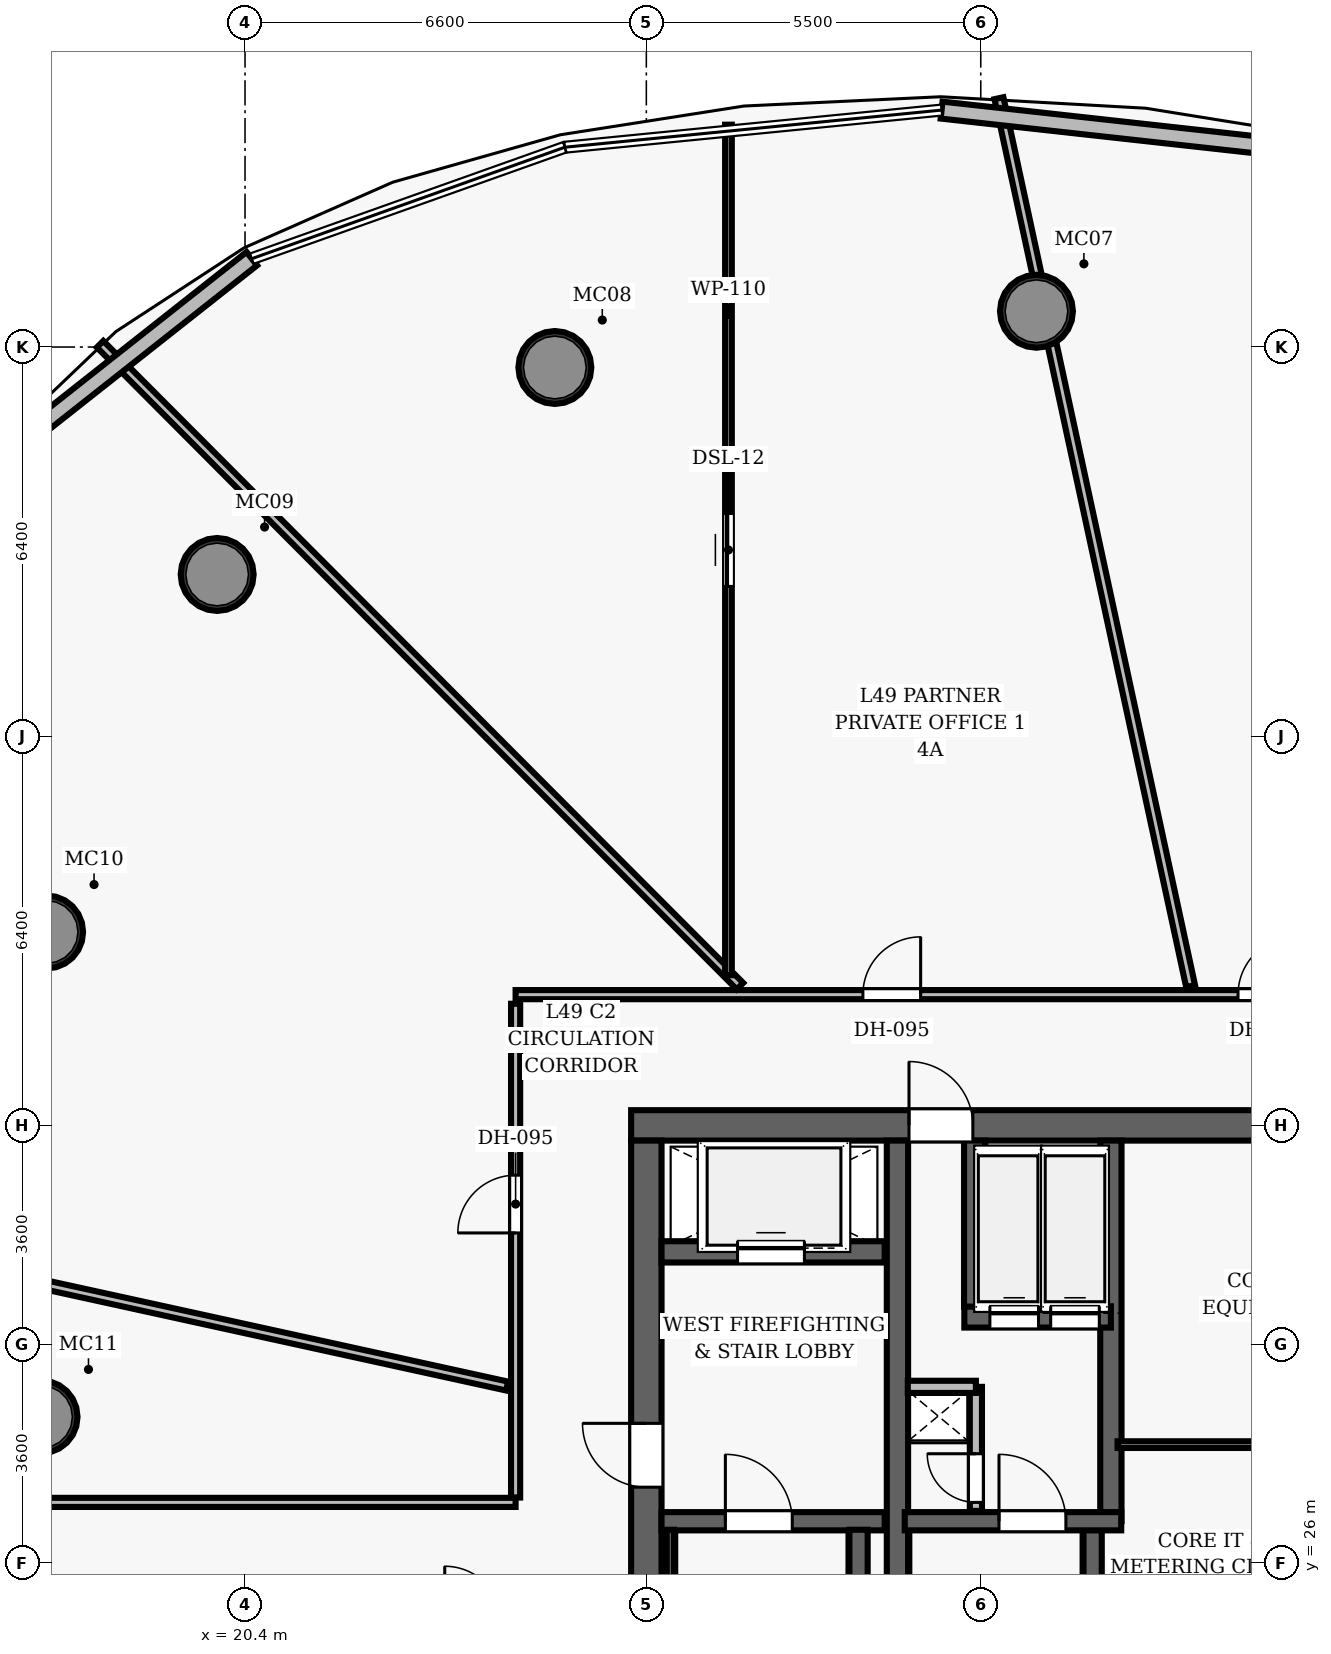
"""IFC4 building model, lengths in metres.
Left out: names, types, materials, properties, quantities, classifications, styles, units other than length and angle.
Written with IfcOpenShell. Run it as: python <this file> out.ifc"""

import sys

from ifc_helpers import new_model, si_unit, direction, frame, frame_2d, origin, origin_2d, place, context, subcontext, project, spatial, rectangle, hollow_circle, extrude, element, fill, save


model = new_model("IFC4")
c1 = context("Model", 3, precision=1e-05, world=origin(), true_north=direction((0.0, 1.0)))
c2 = subcontext(c1, "Body", "Model", "MODEL_VIEW")
j1 = project(units=[si_unit("LENGTHUNIT", "METRE"), si_unit("PLANEANGLEUNIT", "RADIAN")], contexts=[c1])
p1 = place(None, origin())
s1 = spatial("IfcSite", under=j1, at=p1, CompositionType="ELEMENT")
p2 = place(p1, origin())
s2 = spatial("IfcBuilding", under=s1, at=p2, CompositionType="ELEMENT")
p3 = place(p2, frame((0.0, 0.0, 194.3)))
s3 = spatial("IfcBuildingStorey", under=s2, at=p3, CompositionType="ELEMENT", Elevation=194.3)
p4 = place(p3, frame((26.75, 33.2, 0.0), z_axis=(0.0, 0.0, 1.0), x_axis=(1.0, 0.0, 0.0)))
e1 = element("IfcWall", 1, at=p4, inside=s3, PredefinedType="SHEAR", context=c2, shape_type="SweptSolid", body=[
    extrude(rectangle(XDim=22.5, YDim=0.5, at=frame_2d((11.25, 0.0))), origin(), (0.0, 0.0, 1.0), 3.85),
])
p5 = place(p4, frame((4.57, 0.0, 0.0)))
e2 = element("IfcOpeningElement", 2, at=p5, cuts=e1, PredefinedType="OPENING", context=c2, shape_type="SweptSolid", body=[
    extrude(rectangle(XDim=1.05, YDim=2.15, at=frame_2d((0.525, 1.075))), frame((0.0, 0.26, 0.0), z_axis=(0.0, -1.0, 0.0), x_axis=(1.0, 0.0, 0.0)), (0.0, 0.0, 1.0), 0.52),
])
p6 = place(p4, frame((14.47, 0.0, 0.0)))
e3 = element("IfcOpeningElement", 3, at=p6, cuts=e1, PredefinedType="OPENING", context=c2, shape_type="SweptSolid", body=[
    extrude(rectangle(XDim=1.05, YDim=2.15, at=frame_2d((0.525, 1.075))), frame((0.0, 0.26, 0.0), z_axis=(0.0, -1.0, 0.0), x_axis=(1.0, 0.0, 0.0)), (0.0, 0.0, 1.0), 0.52),
])
p7 = place(p3, frame((27.0, 19.05, 0.0), z_axis=(0.0, 0.0, 1.0), x_axis=(0.0, 1.0, 0.0)))
e4 = element("IfcWall", 4, at=p7, inside=s3, PredefinedType="SHEAR", context=c2, shape_type="SweptSolid", body=[
    extrude(rectangle(XDim=13.9, YDim=0.5, at=frame_2d((6.95, 0.0))), origin(), (0.0, 0.0, 1.0), 3.85),
])
p8 = place(p7, frame((8.2, 0.0, 0.0)))
e5 = element("IfcOpeningElement", 5, at=p8, cuts=e4, PredefinedType="OPENING", context=c2, shape_type="SweptSolid", body=[
    extrude(rectangle(XDim=1.05, YDim=2.15, at=frame_2d((0.525, 1.075))), frame((0.0, 0.26, 0.0), z_axis=(0.0, -1.0, 0.0), x_axis=(1.0, 0.0, 0.0)), (0.0, 0.0, 1.0), 0.52),
])
p9 = place(p3, frame((31.13, 19.05, 0.0), z_axis=(0.0, 0.0, 1.0), x_axis=(0.0, 1.0, 0.0)))
e6 = element("IfcWall", 6, at=p9, inside=s3, PredefinedType="SHEAR", context=c2, shape_type="SweptSolid", body=[
    extrude(rectangle(XDim=13.9, YDim=0.35, at=frame_2d((6.95, 0.0))), origin(), (0.0, 0.0, 1.0), 3.85),
])
for number, where, z_axis, x_axis in (
    (7, (33.416, 46.588, 0.0), (0.0, 0.0, 1.0), (1.0, 0.0, 0.0)),
    (8, (25.496, 45.664, 0.0), (0.0, 0.0, 1.0), (1.0, 0.0, 0.0)),
    (9, (19.942, 42.26, 0.0), (0.0, 0.0, 1.0), (1.0, 0.0, 0.0)),
    (10, (17.137, 36.381, 0.0), (0.0, 0.0, 1.0), (1.0, 0.0, 0.0)),
    (11, (17.045, 28.406, 0.0), (0.0, 0.0, 1.0), (1.0, 0.0, 0.0)),
):
    element("IfcColumn", number, at=place(p3, frame(where, z_axis=z_axis, x_axis=x_axis)), inside=s3, PredefinedType="COLUMN", context=c2, shape_type="SweptSolid", body=[
        extrude(hollow_circle(Radius=0.6, WallThickness=0.05, at=origin_2d()), origin(), (0.0, 0.0, 1.0), 3.85),
    ])
p10 = place(p3, frame((27.25, 26.69, 0.0), z_axis=(0.0, 0.0, 1.0), x_axis=(1.0, 0.0, 0.0)))
e12 = element("IfcWall", 12, at=p10, inside=s3, PredefinedType="SHEAR", context=c2, shape_type="SweptSolid", body=[
    extrude(rectangle(XDim=3.67, YDim=0.3, at=frame_2d((1.835, 0.0))), origin(), (0.0, 0.0, 1.0), 3.85),
])
p11 = place(p10, frame((1.05, 0.0, 0.0)))
e13 = element("IfcOpeningElement", 13, at=p11, cuts=e12, PredefinedType="OPENING", context=c2, shape_type="SweptSolid", body=[
    extrude(rectangle(XDim=1.1, YDim=2.15, at=frame_2d((0.55, 1.075))), frame((0.0, 0.16, 0.0), z_axis=(0.0, -1.0, 0.0), x_axis=(1.0, 0.0, 0.0)), (0.0, 0.0, 1.0), 0.32),
])
p12 = place(p3, frame((30.49, 19.05, 0.0), z_axis=(0.0, 0.0, 1.0), x_axis=(0.0, 1.0, 0.0)))
e14 = element("IfcWall", 14, at=p12, inside=s3, PredefinedType="SHEAR", context=c2, shape_type="SweptSolid", body=[
    extrude(rectangle(XDim=7.5, YDim=0.3, at=frame_2d((3.75, 0.0))), origin(), (0.0, 0.0, 1.0), 3.85),
])
p13 = place(p3, frame((27.395, 19.1, 0.0), z_axis=(0.0, 0.0, 1.0), x_axis=(0.0, 1.0, 0.0)))
e15 = element("IfcWall", 15, at=p13, inside=s3, PredefinedType="SHEAR", context=c2, shape_type="SweptSolid", body=[
    extrude(rectangle(XDim=7.45, YDim=0.12, at=frame_2d((3.725, 0.0))), origin(), (0.0, 0.0, 1.0), 3.85),
])
p14 = place(p3, frame((27.25, 31.12, 0.0), z_axis=(0.0, 0.0, 1.0), x_axis=(1.0, 0.0, 0.0)))
e16 = element("IfcWall", 16, at=p14, inside=s3, PredefinedType="SHEAR", context=c2, shape_type="SweptSolid", body=[
    extrude(rectangle(XDim=3.67, YDim=0.35, at=frame_2d((1.835, 0.0))), origin(), (0.0, 0.0, 1.0), 3.035),
])
p15 = place(p14, frame((1.25, 0.0, 0.0)))
e17 = element("IfcOpeningElement", 17, at=p15, cuts=e16, PredefinedType="OPENING", context=c2, shape_type="SweptSolid", body=[
    extrude(rectangle(XDim=1.1, YDim=2.15, at=frame_2d((0.55, 1.075))), frame((0.0, 0.185, 0.0), z_axis=(0.0, -1.0, 0.0), x_axis=(1.0, 0.0, 0.0)), (0.0, 0.0, 1.0), 0.37),
])
p16 = place(p3, frame((34.34, 19.05, 0.0), z_axis=(0.0, 0.0, 1.0), x_axis=(0.0, 1.0, 0.0)))
e18 = element("IfcWall", 18, at=p16, inside=s3, PredefinedType="SHEAR", context=c2, shape_type="SweptSolid", body=[
    extrude(rectangle(XDim=7.5, YDim=0.3, at=frame_2d((3.75, 0.0))), origin(), (0.0, 0.0, 1.0), 3.85),
])
p17 = place(p3, frame((34.64, 26.69, 0.0), z_axis=(0.0, 0.0, 1.0), x_axis=(0.0, 1.0, 0.0)))
e19 = element("IfcWall", 19, at=p17, inside=s3, PredefinedType="SHEAR", context=c2, shape_type="SweptSolid", body=[
    extrude(rectangle(XDim=6.26, YDim=0.35, at=frame_2d((3.13, 0.0))), origin(), (0.0, 0.0, 1.0), 3.85),
])
p18 = place(p3, frame((31.25, 26.69, 0.0), z_axis=(0.0, 0.0, 1.0), x_axis=(1.0, 0.0, 0.0)))
e20 = element("IfcWall", 20, at=p18, inside=s3, PredefinedType="SHEAR", context=c2, shape_type="SweptSolid", body=[
    extrude(rectangle(XDim=3.56, YDim=0.3, at=frame_2d((1.78, 0.0))), origin(), (0.0, 0.0, 1.0), 3.85),
])
p19 = place(p18, frame((1.55, 0.0, 0.0)))
e21 = element("IfcOpeningElement", 21, at=p19, cuts=e20, PredefinedType="OPENING", context=c2, shape_type="SweptSolid", body=[
    extrude(rectangle(XDim=1.1, YDim=2.15, at=frame_2d((0.55, 1.075))), frame((0.0, 0.16, 0.0), z_axis=(0.0, -1.0, 0.0), x_axis=(1.0, 0.0, 0.0)), (0.0, 0.0, 1.0), 0.32),
])
p20 = place(p3, frame((32.23, 30.05, 0.0), z_axis=(0.0, 0.0, 1.0), x_axis=(1.0, 0.0, 0.0)))
e22 = element("IfcWall", 22, at=p20, inside=s3, PredefinedType="SHEAR", context=c2, shape_type="SweptSolid", body=[
    extrude(rectangle(XDim=2.41, YDim=0.35, at=frame_2d((1.205, 0.0))), origin(), (0.0, 0.0, 1.0), 3.035),
])
p21 = place(p20, frame((0.42, 0.0, 0.0)))
e23 = element("IfcOpeningElement", 23, at=p21, cuts=e22, PredefinedType="OPENING", context=c2, shape_type="SweptSolid", body=[
    extrude(rectangle(XDim=0.8, YDim=2.15, at=frame_2d((0.4, 1.075))), frame((0.0, 0.185, 0.0), z_axis=(0.0, -1.0, 0.0), x_axis=(1.0, 0.0, 0.0)), (0.0, 0.0, 1.0), 0.37),
])
p22 = place(p20, frame((1.42, 0.0, 0.0)))
e24 = element("IfcOpeningElement", 24, at=p22, cuts=e22, PredefinedType="OPENING", context=c2, shape_type="SweptSolid", body=[
    extrude(rectangle(XDim=0.8, YDim=2.15, at=frame_2d((0.4, 1.075))), frame((0.0, 0.185, 0.0), z_axis=(0.0, -1.0, 0.0), x_axis=(1.0, 0.0, 0.0)), (0.0, 0.0, 1.0), 0.37),
])
p23 = place(p3, frame((32.4, 30.22, 0.0), z_axis=(0.0, 0.0, 1.0), x_axis=(0.0, 1.0, 0.0)))
e25 = element("IfcWall", 25, at=p23, inside=s3, PredefinedType="SHEAR", context=c2, shape_type="SweptSolid", body=[
    extrude(rectangle(XDim=2.73, YDim=0.35, at=frame_2d((1.365, 0.0))), origin(), (0.0, 0.0, 1.0), 3.035),
])
p24 = place(p3, frame((32.42, 26.86, 0.0), z_axis=(0.0, 0.0, 1.0), x_axis=(0.0, 1.0, 0.0)))
e26 = element("IfcWall", 26, at=p24, inside=s3, PredefinedType="PARTITIONING", context=c2, shape_type="SweptSolid", body=[
    extrude(rectangle(XDim=2.04, YDim=0.2, at=frame_2d((1.02, 0.0))), origin(), (0.0, 0.0, 1.0), 3.035),
])
p25 = place(p24, frame((0.14, 0.0, 0.0)))
e27 = element("IfcOpeningElement", 27, at=p25, cuts=e26, PredefinedType="OPENING", context=c2, shape_type="SweptSolid", body=[
    extrude(rectangle(XDim=0.8, YDim=2.05, at=frame_2d((0.4, 1.025))), frame((0.0, 0.11, 0.0), z_axis=(0.0, -1.0, 0.0), x_axis=(1.0, 0.0, 0.0)), (0.0, 0.0, 1.0), 0.22),
])
p26 = place(p3, frame((31.3, 28.9, 0.0), z_axis=(0.0, 0.0, 1.0), x_axis=(1.0, 0.0, 0.0)))
e28 = element("IfcWall", 28, at=p26, inside=s3, PredefinedType="PARTITIONING", context=c2, shape_type="SweptSolid", body=[
    extrude(rectangle(XDim=1.12, YDim=0.2, at=frame_2d((0.56, 0.0))), origin(), (0.0, 0.0, 1.0), 3.035),
])
p27 = place(p3, frame((34.75, 27.95, 0.0), z_axis=(0.0, 0.0, 1.0), x_axis=(1.0, 0.0, 0.0)))
e29 = element("IfcWall", 29, at=p27, inside=s3, PredefinedType="PARTITIONING", context=c2, shape_type="SweptSolid", body=[
    extrude(rectangle(XDim=6.25, YDim=0.11, at=frame_2d((3.125, 0.0))), origin(), (0.0, 0.0, 1.0), 3.035),
])
p28 = place(p3, frame((24.85, 35.35, 0.0), z_axis=(0.0, 0.0, 1.0), x_axis=(1.0, 0.0, 0.0)))
e30 = element("IfcWall", 30, at=p28, inside=s3, PredefinedType="PARTITIONING", context=c2, shape_type="SweptSolid", body=[
    extrude(rectangle(XDim=26.0, YDim=0.15, at=frame_2d((13.0, 0.0))), origin(), (0.0, 0.0, 1.0), 3.035),
])
p29 = place(p28, frame((18.327, 0.0, 0.0)))
e31 = element("IfcOpeningElement", 31, at=p29, cuts=e30, PredefinedType="OPENING", context=c2, shape_type="SweptSolid", body=[
    extrude(rectangle(XDim=0.95, YDim=2.15, at=frame_2d((0.475, 1.075))), frame((0.0, 0.085, 0.0), z_axis=(0.0, -1.0, 0.0), x_axis=(1.0, 0.0, 0.0)), (0.0, 0.0, 1.0), 0.17),
])
p30 = place(p28, frame((11.881, 0.0, 0.0)))
e32 = element("IfcOpeningElement", 32, at=p30, cuts=e30, PredefinedType="OPENING", context=c2, shape_type="SweptSolid", body=[
    extrude(rectangle(XDim=0.95, YDim=2.15, at=frame_2d((0.475, 1.075))), frame((0.0, 0.085, 0.0), z_axis=(0.0, -1.0, 0.0), x_axis=(1.0, 0.0, 0.0)), (0.0, 0.0, 1.0), 0.17),
])
p31 = place(p28, frame((5.711, 0.0, 0.0)))
e33 = element("IfcOpeningElement", 33, at=p31, cuts=e30, PredefinedType="OPENING", context=c2, shape_type="SweptSolid", body=[
    extrude(rectangle(XDim=0.95, YDim=2.15, at=frame_2d((0.475, 1.075))), frame((0.0, 0.085, 0.0), z_axis=(0.0, -1.0, 0.0), x_axis=(1.0, 0.0, 0.0)), (0.0, 0.0, 1.0), 0.17),
])
p32 = place(p3, frame((24.85, 27.08, 0.0), z_axis=(0.0, 0.0, 1.0), x_axis=(0.0, 1.0, 0.0)))
e34 = element("IfcWall", 34, at=p32, inside=s3, PredefinedType="PARTITIONING", context=c2, shape_type="SweptSolid", body=[
    extrude(rectangle(XDim=8.12, YDim=0.15, at=frame_2d((4.06, 0.0))), origin(), (0.0, 0.0, 1.0), 3.035),
])
p33 = place(p32, frame((4.351, 0.0, 0.0)))
e35 = element("IfcOpeningElement", 35, at=p33, cuts=e34, PredefinedType="OPENING", context=c2, shape_type="SweptSolid", body=[
    extrude(rectangle(XDim=0.95, YDim=2.15, at=frame_2d((0.475, 1.075))), frame((0.0, 0.085, 0.0), z_axis=(0.0, -1.0, 0.0), x_axis=(1.0, 0.0, 0.0)), (0.0, 0.0, 1.0), 0.17),
])
p34 = place(p3, frame((16.088, 27.0, 0.0), z_axis=(0.0, 0.0, 1.0), x_axis=(1.0, 0.0, 0.0)))
e36 = element("IfcWall", 36, at=p34, inside=s3, PredefinedType="PARTITIONING", context=c2, shape_type="SweptSolid", body=[
    extrude(rectangle(XDim=8.762, YDim=0.15, at=frame_2d((4.381, 0.0))), origin(), (0.0, 0.0, 1.0), 3.035),
])
p35 = place(p3, frame((35.951, 35.49, 0.0), z_axis=(0.0, 0.0, 1.0), x_axis=(-0.211018834745, 0.977481995426, 0.0)))
e37 = element("IfcWall", 37, at=p35, inside=s3, PredefinedType="PARTITIONING", context=c2, shape_type="SweptSolid", body=[
    extrude(rectangle(XDim=14.939, YDim=0.15, at=frame_2d((7.469, 0.0))), origin(), (0.0, 0.0, 1.0), 3.035),
])
p36 = place(p3, frame((28.54, 35.49, 0.0), z_axis=(0.0, 0.0, 1.0), x_axis=(-0.705984007836, 0.708227774575, 0.0)))
e38 = element("IfcWall", 38, at=p36, inside=s3, PredefinedType="PARTITIONING", context=c2, shape_type="SweptSolid", body=[
    extrude(rectangle(XDim=14.907, YDim=0.15, at=frame_2d((7.453, 0.0))), origin(), (0.0, 0.0, 1.0), 3.035),
])
p37 = place(p3, frame((24.71, 28.913, 0.0), z_axis=(0.0, 0.0, 1.0), x_axis=(-0.976806374433, 0.214124512534, 0.0)))
e39 = element("IfcWall", 39, at=p37, inside=s3, PredefinedType="PARTITIONING", context=c2, shape_type="SweptSolid", body=[
    extrude(rectangle(XDim=12.054, YDim=0.15, at=frame_2d((6.027, 0.0))), origin(), (0.0, 0.0, 1.0), 3.035),
])
p38 = place(p3, frame((28.351, 35.67, 0.0), z_axis=(0.0, 0.0, 1.0), x_axis=(0.0, 1.0, 0.0)))
e40 = element("IfcWall", 40, at=p38, inside=s3, PredefinedType="PARTITIONING", context=c2, shape_type="SweptSolid", body=[
    extrude(rectangle(XDim=13.987, YDim=0.11, at=frame_2d((6.993, 0.0))), origin(), (0.0, 0.0, 1.0), 3.035),
])
p39 = place(p38, frame((6.393, 0.0, 0.0)))
e41 = element("IfcOpeningElement", 41, at=p39, cuts=e40, PredefinedType="OPENING", context=c2, shape_type="SweptSolid", body=[
    extrude(rectangle(XDim=1.2, YDim=2.15, at=frame_2d((0.6, 1.075))), frame((0.0, 0.065, 0.0), z_axis=(0.0, -1.0, 0.0), x_axis=(1.0, 0.0, 0.0)), (0.0, 0.0, 1.0), 0.13),
])
p40 = place(p3, frame((31.856, 49.896, 0.0), z_axis=(0.0, 0.0, 1.0), x_axis=(0.993966830352, -0.109681083879, 0.0)))
e42 = element("IfcWall", 42, at=p40, inside=s3, PredefinedType="SOLIDWALL", context=c2, shape_type="SweptSolid", body=[
    extrude(rectangle(XDim=6.785, YDim=0.28, at=frame_2d((3.392, 0.0))), origin(), (0.0, 0.0, 1.0), 3.62),
])
p41 = place(p3, frame((16.684, 44.432, 0.0), z_axis=(0.0, 0.0, 1.0), x_axis=(0.784940432432, 0.619571236851, 0.0)))
e43 = element("IfcWall", 43, at=p41, inside=s3, PredefinedType="SOLIDWALL", context=c2, shape_type="SweptSolid", body=[
    extrude(rectangle(XDim=4.876, YDim=0.28, at=frame_2d((2.438, 0.0))), origin(), (0.0, 0.0, 1.0), 3.62),
])
p42 = place(p11, origin())
e44 = element("IfcDoor", 44, at=p42, inside=s3, OperationType="SINGLE_SWING_LEFT", PredefinedType="DOOR", context=c2, shape_type="SweptSolid", body=[
    extrude(rectangle(XDim=1.1, YDim=2.15, at=frame_2d((0.55, 1.075))), frame((0.0, 0.025, 0.0), z_axis=(0.0, -1.0, 0.0), x_axis=(1.0, 0.0, 0.0)), (0.0, 0.0, 1.0), 0.05),
])
fill(e13, e44)
p43 = place(p8, origin())
e45 = element("IfcDoor", 45, at=p43, inside=s3, OperationType="SINGLE_SWING_RIGHT", PredefinedType="DOOR", context=c2, shape_type="SweptSolid", body=[
    extrude(rectangle(XDim=1.05, YDim=2.15, at=frame_2d((0.525, 1.075))), frame((0.0, 0.025, 0.0), z_axis=(0.0, -1.0, 0.0), x_axis=(1.0, 0.0, 0.0)), (0.0, 0.0, 1.0), 0.05),
])
fill(e5, e45)
p44 = place(p19, origin())
e46 = element("IfcDoor", 46, at=p44, inside=s3, OperationType="SINGLE_SWING_LEFT", PredefinedType="DOOR", context=c2, shape_type="SweptSolid", body=[
    extrude(rectangle(XDim=1.1, YDim=2.15, at=frame_2d((0.55, 1.075))), frame((0.0, 0.025, 0.0), z_axis=(0.0, -1.0, 0.0), x_axis=(1.0, 0.0, 0.0)), (0.0, 0.0, 1.0), 0.05),
])
fill(e21, e46)
p45 = place(p25, origin())
e47 = element("IfcDoor", 47, at=p45, inside=s3, OperationType="SINGLE_SWING_RIGHT", PredefinedType="DOOR", context=c2, shape_type="SweptSolid", body=[
    extrude(rectangle(XDim=0.8, YDim=2.05, at=frame_2d((0.4, 1.025))), frame((0.0, 0.025, 0.0), z_axis=(0.0, -1.0, 0.0), x_axis=(1.0, 0.0, 0.0)), (0.0, 0.0, 1.0), 0.05),
])
fill(e27, e47)
p46 = place(p5, origin())
e48 = element("IfcDoor", 48, at=p46, inside=s3, OperationType="SINGLE_SWING_LEFT", PredefinedType="DOOR", context=c2, shape_type="SweptSolid", body=[
    extrude(rectangle(XDim=1.05, YDim=2.15, at=frame_2d((0.525, 1.075))), frame((0.0, 0.025, 0.0), z_axis=(0.0, -1.0, 0.0), x_axis=(1.0, 0.0, 0.0)), (0.0, 0.0, 1.0), 0.05),
])
fill(e2, e48)
p47 = place(p30, origin())
e49 = element("IfcDoor", 49, at=p47, inside=s3, OperationType="SINGLE_SWING_RIGHT", PredefinedType="DOOR", context=c2, shape_type="SweptSolid", body=[
    extrude(rectangle(XDim=0.95, YDim=2.15, at=frame_2d((0.475, 1.075))), frame((0.0, 0.025, 0.0), z_axis=(0.0, -1.0, 0.0), x_axis=(1.0, 0.0, 0.0)), (0.0, 0.0, 1.0), 0.05),
])
fill(e32, e49)
p48 = place(p31, origin())
e50 = element("IfcDoor", 50, at=p48, inside=s3, OperationType="SINGLE_SWING_RIGHT", PredefinedType="DOOR", context=c2, shape_type="SweptSolid", body=[
    extrude(rectangle(XDim=0.95, YDim=2.15, at=frame_2d((0.475, 1.075))), frame((0.0, 0.025, 0.0), z_axis=(0.0, -1.0, 0.0), x_axis=(1.0, 0.0, 0.0)), (0.0, 0.0, 1.0), 0.05),
])
fill(e33, e50)
p49 = place(p39, origin())
e51 = element("IfcDoor", 51, at=p49, inside=s3, OperationType="SLIDING_TO_RIGHT", PredefinedType="DOOR", context=c2, shape_type="SweptSolid", body=[
    extrude(rectangle(XDim=1.2, YDim=2.15, at=frame_2d((0.6, 1.075))), frame((0.0, 0.025, 0.0), z_axis=(0.0, -1.0, 0.0), x_axis=(1.0, 0.0, 0.0)), (0.0, 0.0, 1.0), 0.05),
])
fill(e41, e51)
p50 = place(p33, origin())
e52 = element("IfcDoor", 52, at=p50, inside=s3, OperationType="SINGLE_SWING_LEFT", PredefinedType="DOOR", context=c2, shape_type="SweptSolid", body=[
    extrude(rectangle(XDim=0.95, YDim=2.15, at=frame_2d((0.475, 1.075))), frame((0.0, 0.025, 0.0), z_axis=(0.0, -1.0, 0.0), x_axis=(1.0, 0.0, 0.0)), (0.0, 0.0, 1.0), 0.05),
])
fill(e35, e52)
p51 = place(p15, origin())
e53 = element("IfcDoor", 53, at=p51, inside=s3, OperationType="SLIDING_TO_LEFT", PredefinedType="DOOR", context=c2, shape_type="SweptSolid", body=[
    extrude(rectangle(XDim=1.1, YDim=2.15, at=frame_2d((0.55, 1.075))), frame((0.0, 0.025, 0.0), z_axis=(0.0, -1.0, 0.0), x_axis=(1.0, 0.0, 0.0)), (0.0, 0.0, 1.0), 0.05),
])
fill(e17, e53)
p52 = place(p21, origin())
e54 = element("IfcDoor", 54, at=p52, inside=s3, OperationType="SLIDING_TO_LEFT", PredefinedType="DOOR", context=c2, shape_type="SweptSolid", body=[
    extrude(rectangle(XDim=0.8, YDim=2.15, at=frame_2d((0.4, 1.075))), frame((0.0, 0.025, 0.0), z_axis=(0.0, -1.0, 0.0), x_axis=(1.0, 0.0, 0.0)), (0.0, 0.0, 1.0), 0.05),
])
fill(e23, e54)
p53 = place(p22, origin())
e55 = element("IfcDoor", 55, at=p53, inside=s3, OperationType="SLIDING_TO_LEFT", PredefinedType="DOOR", context=c2, shape_type="SweptSolid", body=[
    extrude(rectangle(XDim=0.8, YDim=2.15, at=frame_2d((0.4, 1.075))), frame((0.0, 0.025, 0.0), z_axis=(0.0, -1.0, 0.0), x_axis=(1.0, 0.0, 0.0)), (0.0, 0.0, 1.0), 0.05),
])
fill(e24, e55)
save(model, sys.argv[1])
